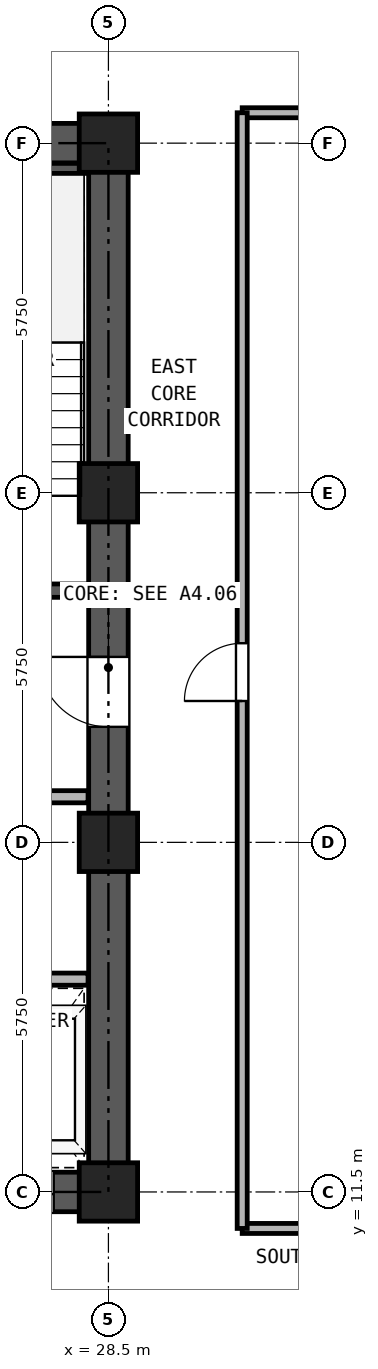
"""IFC4 building model, lengths in metres.
Left out: names, types, materials, properties, quantities, classifications, styles, units other than length and angle.
Written with IfcOpenShell. Run it as: python <this file> out.ifc"""

import sys

from ifc_helpers import new_model, si_unit, direction, frame, frame_2d, origin, origin_2d, place, context, subcontext, project, spatial, rectangle, hollow_rectangle, extrude, source, transform, mapped, element, fill, save


model = new_model("IFC4")
c1 = context("Model", 3, precision=1e-05, world=origin(), true_north=direction((0.0, 1.0)))
c2 = subcontext(c1, "Body", "Model", "MODEL_VIEW")
j1 = project(units=[si_unit("LENGTHUNIT", "METRE"), si_unit("PLANEANGLEUNIT", "RADIAN")], contexts=[c1])
p1 = place(None, origin())
s1 = spatial("IfcSite", under=j1, at=p1, CompositionType="ELEMENT")
p2 = place(p1, origin())
s2 = spatial("IfcBuilding", under=s1, at=p2, CompositionType="ELEMENT")
p3 = place(p2, frame((0.0, 0.0, 22.5)))
s3 = spatial("IfcBuildingStorey", under=s2, at=p3, CompositionType="ELEMENT", Elevation=22.5)
m1 = source(origin(), c2, "Body", "SweptSolid", [
    extrude(hollow_rectangle(XDim=0.96, YDim=0.96, WallThickness=0.06, at=origin_2d()), origin(), (0.0, 0.0, 1.0), 3.32),
])
for number, where, z_axis, x_axis in (
    (1, (28.5, 11.5, 0.0), (0.0, 0.0, 1.0), (1.0, 0.0, 0.0)),
    (2, (28.5, 17.25, 0.0), (0.0, 0.0, 1.0), (1.0, 0.0, 0.0)),
    (3, (28.5, 23.0, 0.0), (0.0, 0.0, 1.0), (1.0, 0.0, 0.0)),
    (4, (28.5, 28.75, 0.0), (0.0, 0.0, 1.0), (1.0, 0.0, 0.0)),
):
    element("IfcColumn", number, at=place(p3, frame(where, z_axis=z_axis, x_axis=x_axis)), inside=s3, PredefinedType="COLUMN", context=c2, shape_type="MappedRepresentation", body=[
        mapped(m1, transform((0.0, 0.0, 0.0), x_axis=(1.0, 0.0, 0.0), y_axis=(0.0, 1.0, 0.0), z_axis=(0.0, 0.0, 1.0), scale=1.0)),
    ])
p4 = place(p3, frame((18.175, 11.5, 0.0), z_axis=(0.0, 0.0, 1.0), x_axis=(1.0, 0.0, 0.0)))
e5 = element("IfcWall", 5, at=p4, inside=s3, PredefinedType="SHEAR", context=c2, shape_type="SweptSolid", body=[
    extrude(rectangle(XDim=10.65, YDim=0.65, at=frame_2d((5.325, 0.0))), origin(), (0.0, 0.0, 1.0), 3.32),
])
p5 = place(p4, frame((1.195, 0.0, 0.0)))
e6 = element("IfcOpeningElement", 6, at=p5, cuts=e5, PredefinedType="OPENING", context=c2, shape_type="SweptSolid", body=[
    extrude(rectangle(XDim=1.1, YDim=2.25, at=frame_2d((0.55, 1.125))), frame((0.0, 0.335, 0.0), z_axis=(0.0, -1.0, 0.0), x_axis=(1.0, 0.0, 0.0)), (0.0, 0.0, 1.0), 0.67),
])
p6 = place(p4, frame((3.495, 0.0, 0.0)))
e7 = element("IfcOpeningElement", 7, at=p6, cuts=e5, PredefinedType="OPENING", context=c2, shape_type="SweptSolid", body=[
    extrude(rectangle(XDim=1.1, YDim=2.25, at=frame_2d((0.55, 1.125))), frame((0.0, 0.335, 0.0), z_axis=(0.0, -1.0, 0.0), x_axis=(1.0, 0.0, 0.0)), (0.0, 0.0, 1.0), 0.67),
])
p7 = place(p4, frame((5.925, 0.0, 0.0)))
e8 = element("IfcOpeningElement", 8, at=p7, cuts=e5, PredefinedType="OPENING", context=c2, shape_type="SweptSolid", body=[
    extrude(rectangle(XDim=1.1, YDim=2.25, at=frame_2d((0.55, 1.125))), frame((0.0, 0.335, 0.0), z_axis=(0.0, -1.0, 0.0), x_axis=(1.0, 0.0, 0.0)), (0.0, 0.0, 1.0), 0.67),
])
p8 = place(p4, frame((8.325, 0.0, 0.0)))
e9 = element("IfcOpeningElement", 9, at=p8, cuts=e5, PredefinedType="OPENING", context=c2, shape_type="SweptSolid", body=[
    extrude(rectangle(XDim=1.1, YDim=2.25, at=frame_2d((0.55, 1.125))), frame((0.0, 0.335, 0.0), z_axis=(0.0, -1.0, 0.0), x_axis=(1.0, 0.0, 0.0)), (0.0, 0.0, 1.0), 0.67),
])
p9 = place(p3, frame((18.175, 28.75, 0.0), z_axis=(0.0, 0.0, 1.0), x_axis=(1.0, 0.0, 0.0)))
e10 = element("IfcWall", 10, at=p9, inside=s3, PredefinedType="SHEAR", context=c2, shape_type="SweptSolid", body=[
    extrude(rectangle(XDim=10.65, YDim=0.65, at=frame_2d((5.325, 0.0))), origin(), (0.0, 0.0, 1.0), 3.32),
])
p10 = place(p9, frame((4.205, 0.0, 0.0)))
e11 = element("IfcOpeningElement", 11, at=p10, cuts=e10, PredefinedType="OPENING", context=c2, shape_type="SweptSolid", body=[
    extrude(rectangle(XDim=0.9, YDim=2.05, at=frame_2d((0.45, 1.025))), frame((0.0, 0.335, 0.0), z_axis=(0.0, -1.0, 0.0), x_axis=(1.0, 0.0, 0.0)), (0.0, 0.0, 1.0), 0.67),
])
p11 = place(p9, frame((5.745, 0.0, 0.0)))
e12 = element("IfcOpeningElement", 12, at=p11, cuts=e10, PredefinedType="OPENING", context=c2, shape_type="SweptSolid", body=[
    extrude(rectangle(XDim=0.9, YDim=2.05, at=frame_2d((0.45, 1.025))), frame((0.0, 0.335, 0.0), z_axis=(0.0, -1.0, 0.0), x_axis=(1.0, 0.0, 0.0)), (0.0, 0.0, 1.0), 0.67),
])
p12 = place(p3, frame((28.5, 11.825, 0.0), z_axis=(0.0, 0.0, 1.0), x_axis=(0.0, 1.0, 0.0)))
e13 = element("IfcWall", 13, at=p12, inside=s3, PredefinedType="SHEAR", context=c2, shape_type="SweptSolid", body=[
    extrude(rectangle(XDim=16.6, YDim=0.65, at=frame_2d((8.3, 0.0))), origin(), (0.0, 0.0, 1.0), 3.32),
])
p13 = place(p12, frame((7.325, 0.0, 0.0)))
e14 = element("IfcOpeningElement", 14, at=p13, cuts=e13, PredefinedType="OPENING", context=c2, shape_type="SweptSolid", body=[
    extrude(rectangle(XDim=1.15, YDim=2.2, at=frame_2d((0.575, 1.1))), frame((0.0, 0.335, 0.0), z_axis=(0.0, -1.0, 0.0), x_axis=(1.0, 0.0, 0.0)), (0.0, 0.0, 1.0), 0.67),
])
p14 = place(p3, frame((25.13, 28.335, 0.0), z_axis=(0.0, 0.0, 1.0), x_axis=(1.0, 0.0, 0.0)))
e15 = element("IfcWall", 15, at=p14, inside=s3, PredefinedType="PARTITIONING", context=c2, shape_type="SweptSolid", body=[
    extrude(rectangle(XDim=3.035, YDim=0.165, at=frame_2d((1.518, 0.0))), origin(), (0.0, 0.0, 1.0), 3.32),
])
p15 = place(p3, frame((25.13, 21.39, 0.0), z_axis=(0.0, 0.0, 1.0), x_axis=(1.0, 0.0, 0.0)))
e16 = element("IfcWall", 16, at=p15, inside=s3, PredefinedType="SOLIDWALL", context=c2, shape_type="SweptSolid", body=[
    extrude(rectangle(XDim=3.035, YDim=0.22, at=frame_2d((1.518, 0.0))), origin(), (0.0, 0.0, 1.0), 3.32),
])
p16 = place(p15, frame((0.92, 0.0, 0.0)))
e17 = element("IfcOpeningElement", 17, at=p16, cuts=e16, PredefinedType="OPENING", context=c2, shape_type="SweptSolid", body=[
    extrude(rectangle(XDim=1.15, YDim=2.2, at=frame_2d((0.575, 1.1))), frame((0.0, 0.12, 0.0), z_axis=(0.0, -1.0, 0.0), x_axis=(1.0, 0.0, 0.0)), (0.0, 0.0, 1.0), 0.24),
])
p17 = place(p3, frame((18.835, 18.0, 0.0), z_axis=(0.0, 0.0, 1.0), x_axis=(1.0, 0.0, 0.0)))
e18 = element("IfcWall", 18, at=p17, inside=s3, PredefinedType="PARTITIONING", context=c2, shape_type="SweptSolid", body=[
    extrude(rectangle(XDim=9.33, YDim=0.2, at=frame_2d((4.665, 0.0))), origin(), (0.0, 0.0, 1.0), 3.32),
])
p18 = place(p17, frame((0.415, 0.0, 0.0)))
e19 = element("IfcOpeningElement", 19, at=p18, cuts=e18, PredefinedType="OPENING", context=c2, shape_type="SweptSolid", body=[
    extrude(rectangle(XDim=1.3, YDim=2.3, at=frame_2d((0.65, 1.15))), frame((0.0, 0.11, 0.0), z_axis=(0.0, -1.0, 0.0), x_axis=(1.0, 0.0, 0.0)), (0.0, 0.0, 1.0), 0.22),
])
p19 = place(p17, frame((2.515, 0.0, 0.0)))
e20 = element("IfcOpeningElement", 20, at=p19, cuts=e18, PredefinedType="OPENING", context=c2, shape_type="SweptSolid", body=[
    extrude(rectangle(XDim=1.3, YDim=2.3, at=frame_2d((0.65, 1.15))), frame((0.0, 0.11, 0.0), z_axis=(0.0, -1.0, 0.0), x_axis=(1.0, 0.0, 0.0)), (0.0, 0.0, 1.0), 0.22),
])
p20 = place(p17, frame((7.015, 0.0, 0.0)))
e21 = element("IfcOpeningElement", 21, at=p20, cuts=e18, PredefinedType="OPENING", context=c2, shape_type="SweptSolid", body=[
    extrude(rectangle(XDim=1.0, YDim=2.15, at=frame_2d((0.5, 1.075))), frame((0.0, 0.11, 0.0), z_axis=(0.0, -1.0, 0.0), x_axis=(1.0, 0.0, 0.0)), (0.0, 0.0, 1.0), 0.22),
])
p21 = place(p3, frame((18.835, 15.0, 0.0), z_axis=(0.0, 0.0, 1.0), x_axis=(1.0, 0.0, 0.0)))
e22 = element("IfcWall", 22, at=p21, inside=s3, PredefinedType="PARTITIONING", context=c2, shape_type="SweptSolid", body=[
    extrude(rectangle(XDim=9.33, YDim=0.2, at=frame_2d((4.665, 0.0))), origin(), (0.0, 0.0, 1.0), 3.32),
])
for number, where, z_axis, x_axis in (
    (23, (30.7, 10.9, 0.0), (0.0, 0.0, 1.0), (1.0, 0.0, 0.0)),
    (24, (30.7, 29.25, 0.0), (0.0, 0.0, 1.0), (1.0, 0.0, 0.0)),
):
    element("IfcWall", number, at=place(p3, frame(where, z_axis=z_axis, x_axis=x_axis)), inside=s3, PredefinedType="PARTITIONING", context=c2, shape_type="SweptSolid", body=[
        extrude(rectangle(XDim=8.1, YDim=0.165, at=frame_2d((4.05, 0.0))), origin(), (0.0, 0.0, 1.0), 3.32),
    ])
p22 = place(p3, frame((30.7, 10.9, 0.0), z_axis=(0.0, 0.0, 1.0), x_axis=(0.0, 1.0, 0.0)))
e25 = element("IfcWall", 25, at=p22, inside=s3, PredefinedType="PARTITIONING", context=c2, shape_type="SweptSolid", body=[
    extrude(rectangle(XDim=18.35, YDim=0.165, at=frame_2d((9.175, 0.0))), origin(), (0.0, 0.0, 1.0), 3.32),
])
p23 = place(p22, frame((8.675, 0.0, 0.0)))
e26 = element("IfcOpeningElement", 26, at=p23, cuts=e25, PredefinedType="OPENING", context=c2, shape_type="SweptSolid", body=[
    extrude(rectangle(XDim=0.95, YDim=2.15, at=frame_2d((0.475, 1.075))), frame((0.0, 0.093, 0.0), z_axis=(0.0, -1.0, 0.0), x_axis=(1.0, 0.0, 0.0)), (0.0, 0.0, 1.0), 0.185),
])
p24 = place(p13, origin())
e27 = element("IfcDoor", 27, at=p24, inside=s3, OperationType="SINGLE_SWING_RIGHT", PredefinedType="DOOR", context=c2, shape_type="SweptSolid", body=[
    extrude(rectangle(XDim=1.15, YDim=2.2, at=frame_2d((0.575, 1.1))), frame((0.0, 0.025, 0.0), z_axis=(0.0, -1.0, 0.0), x_axis=(1.0, 0.0, 0.0)), (0.0, 0.0, 1.0), 0.05),
])
fill(e14, e27)
p25 = place(p8, frame((1.1, 0.0, 0.0), z_axis=(0.0, 0.0, 1.0), x_axis=(-1.0, 0.0, 0.0)))
e28 = element("IfcDoor", 28, at=p25, inside=s3, OperationType="DOUBLE_DOOR_SLIDING", PredefinedType="DOOR", context=c2, shape_type="SweptSolid", body=[
    extrude(rectangle(XDim=1.1, YDim=2.25, at=frame_2d((0.55, 1.125))), frame((0.0, 0.025, 0.0), z_axis=(0.0, -1.0, 0.0), x_axis=(1.0, 0.0, 0.0)), (0.0, 0.0, 1.0), 0.05),
])
fill(e9, e28)
p26 = place(p23, origin())
e29 = element("IfcDoor", 29, at=p26, inside=s3, OperationType="SINGLE_SWING_LEFT", PredefinedType="DOOR", context=c2, shape_type="SweptSolid", body=[
    extrude(rectangle(XDim=0.95, YDim=2.15, at=frame_2d((0.475, 1.075))), frame((0.0, 0.025, 0.0), z_axis=(0.0, -1.0, 0.0), x_axis=(1.0, 0.0, 0.0)), (0.0, 0.0, 1.0), 0.05),
])
fill(e26, e29)
save(model, sys.argv[1])
